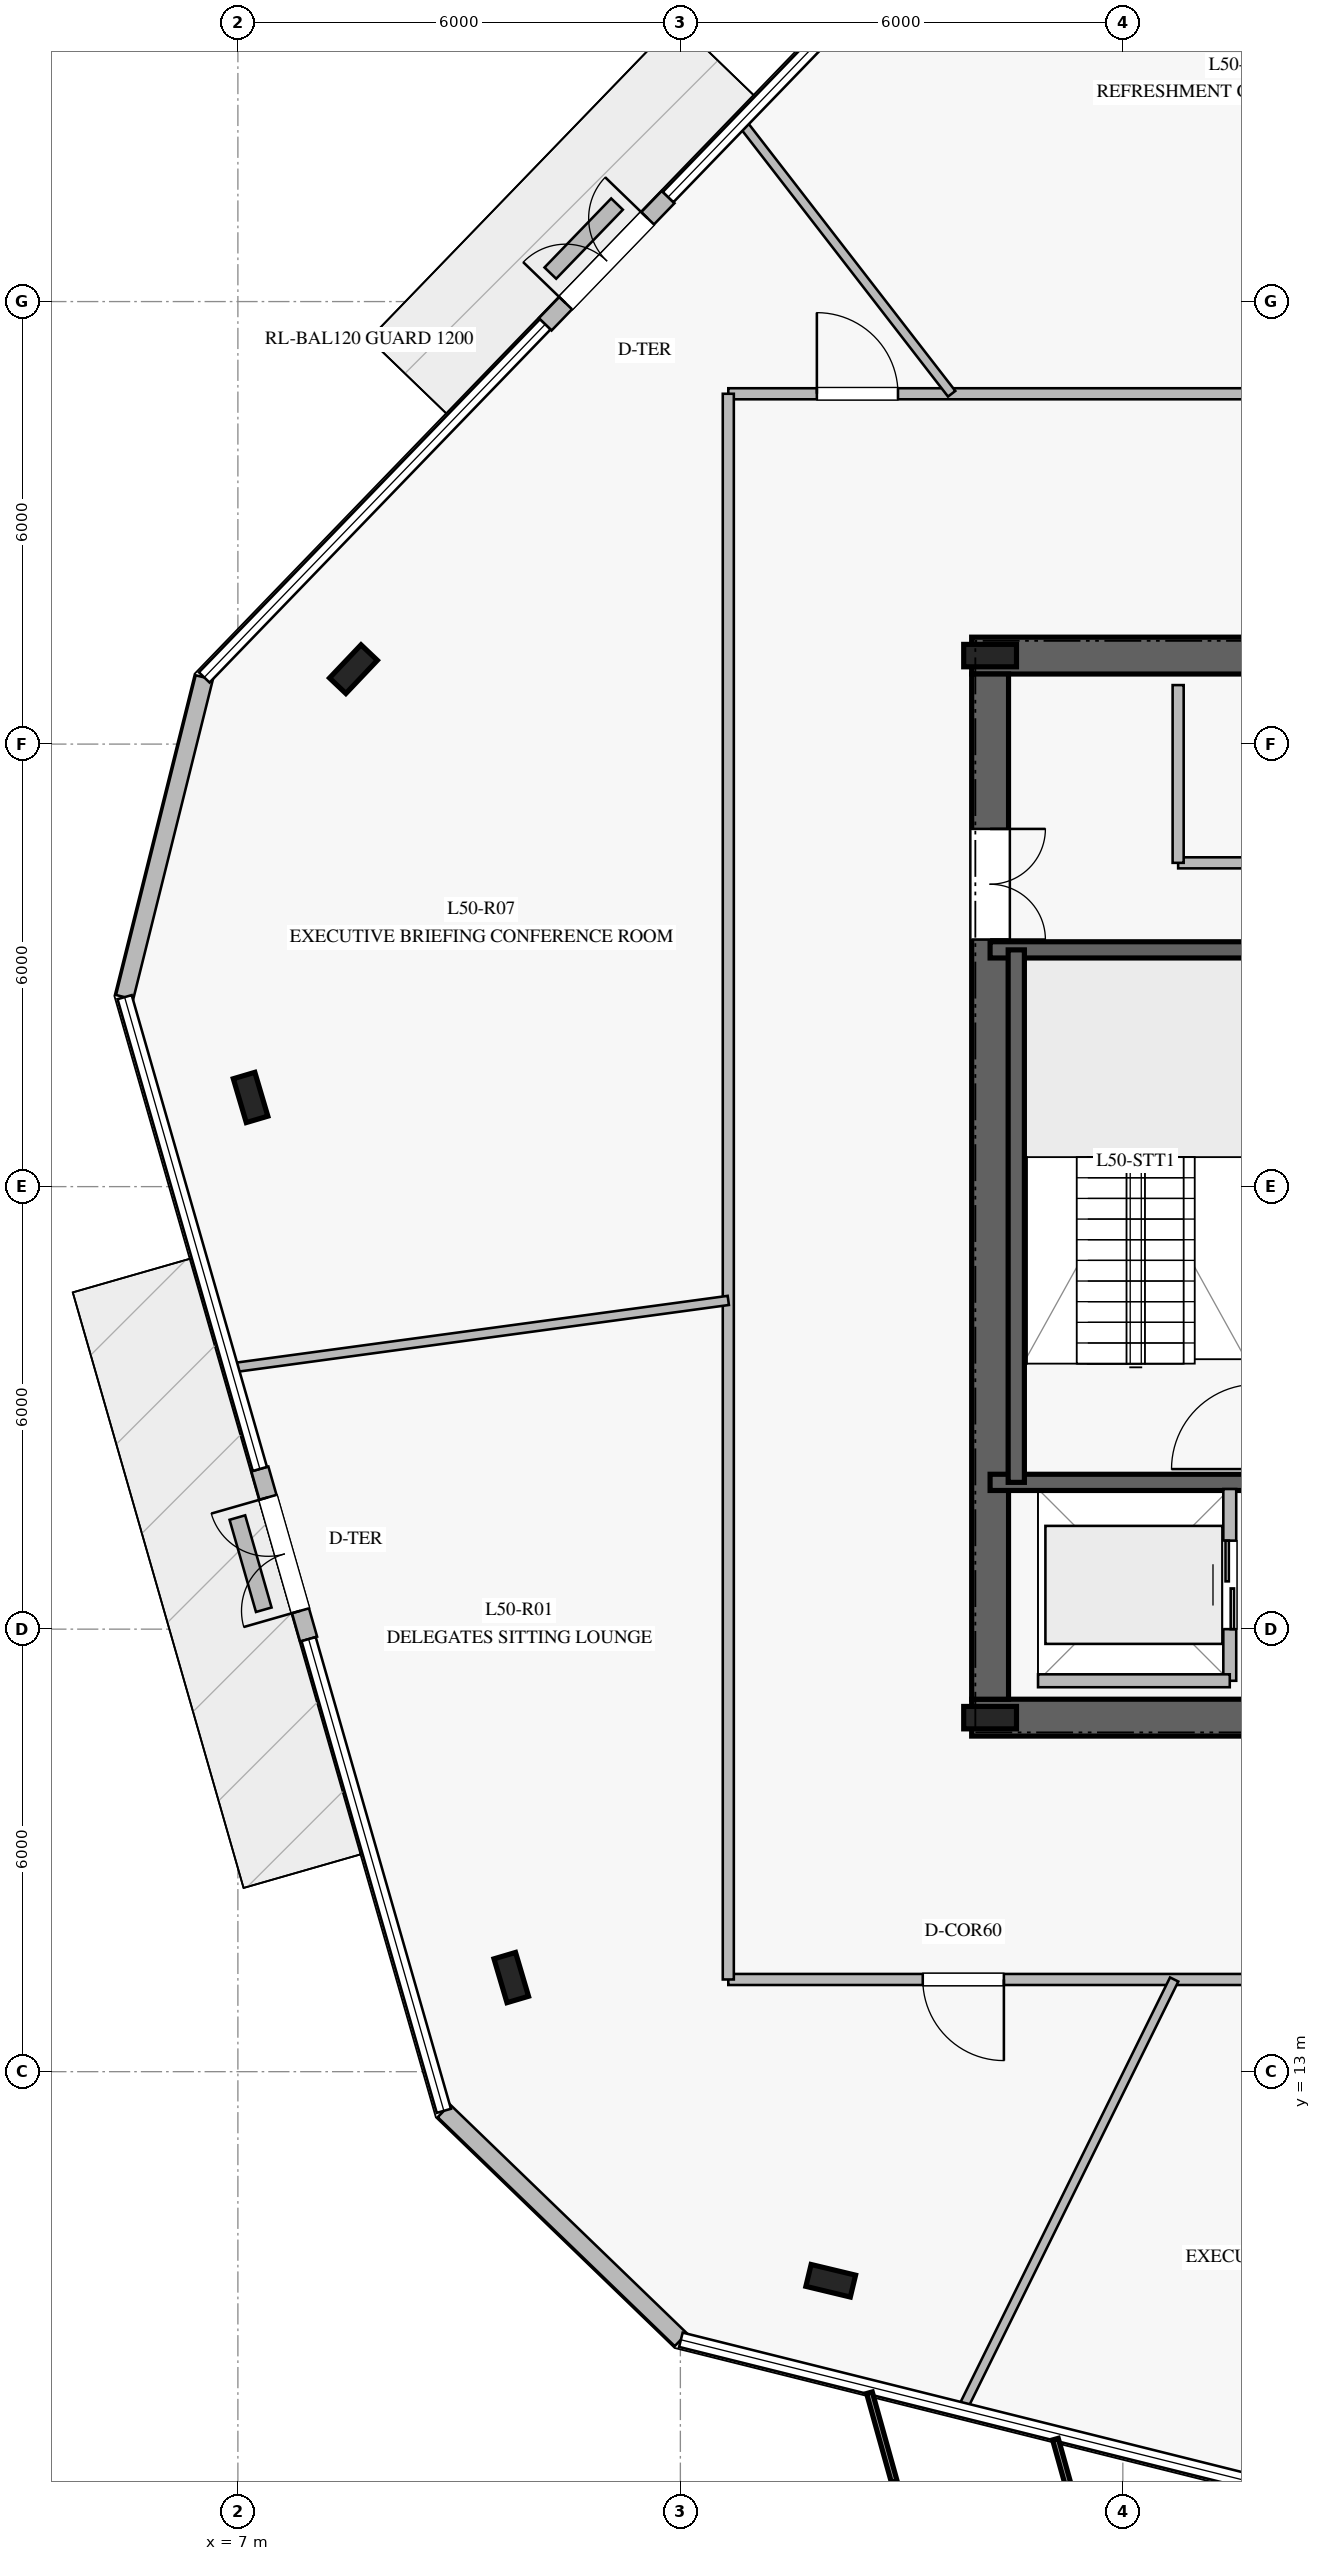
"""IFC4 building model, lengths in metres.
Left out: names, types, materials, properties, quantities, classifications, styles, units other than length and angle.
Written with IfcOpenShell. Run it as: python <this file> out.ifc"""

import sys

from ifc_helpers import new_model, si_unit, direction, frame, frame_2d, origin, origin_2d, place, context, subcontext, project, spatial, rectangle, i_section, extrude, element, fill, save


model = new_model("IFC4")
c1 = context("Model", 3, precision=1e-05, world=origin(), true_north=direction((0.0, 1.0)))
c2 = subcontext(c1, "Body", "Model", "MODEL_VIEW")
j1 = project(units=[si_unit("LENGTHUNIT", "METRE"), si_unit("PLANEANGLEUNIT", "RADIAN")], contexts=[c1])
p1 = place(None, origin())
s1 = spatial("IfcSite", under=j1, at=p1, CompositionType="ELEMENT")
p2 = place(p1, origin())
s2 = spatial("IfcBuilding", under=s1, at=p2, CompositionType="ELEMENT")
p3 = place(p2, frame((0.0, 0.0, 208.8)))
s3 = spatial("IfcBuildingStorey", under=s2, at=p3, CompositionType="ELEMENT", Elevation=208.8)
p4 = place(p3, frame((16.95, 17.8, 0.0), z_axis=(0.0, 0.0, 1.0), x_axis=(1.0, 0.0, 0.0)))
e1 = element("IfcWall", 1, at=p4, inside=s3, PredefinedType="SHEAR", context=c2, shape_type="SweptSolid", body=[
    extrude(rectangle(XDim=16.1, YDim=0.5, at=frame_2d((8.05, 0.0))), origin(), (0.0, 0.0, 1.0), 3.78),
])
p5 = place(p4, frame((5.0, 0.0, 0.0)))
e2 = element("IfcOpeningElement", 2, at=p5, cuts=e1, PredefinedType="OPENING", context=c2, shape_type="SweptSolid", body=[
    extrude(rectangle(XDim=1.2, YDim=2.25, at=frame_2d((0.6, 1.125))), frame((0.0, 0.26, 0.0), z_axis=(0.0, -1.0, 0.0), x_axis=(1.0, 0.0, 0.0)), (0.0, 0.0, 1.0), 0.52),
])
p6 = place(p4, frame((13.95, 0.0, 0.0)))
e3 = element("IfcOpeningElement", 3, at=p6, cuts=e1, PredefinedType="OPENING", context=c2, shape_type="SweptSolid", body=[
    extrude(rectangle(XDim=0.9, YDim=2.1, at=frame_2d((0.45, 1.05))), frame((0.0, 0.26, 0.0), z_axis=(0.0, -1.0, 0.0), x_axis=(1.0, 0.0, 0.0)), (0.0, 0.0, 1.0), 0.52),
])
p7 = place(p4, frame((9.2, 0.0, 0.0)))
e4 = element("IfcOpeningElement", 4, at=p7, cuts=e1, PredefinedType="OPENING", context=c2, shape_type="SweptSolid", body=[
    extrude(rectangle(XDim=1.1, YDim=2.2, at=frame_2d((0.55, 1.1))), frame((0.0, 0.26, 0.0), z_axis=(0.0, -1.0, 0.0), x_axis=(1.0, 0.0, 0.0)), (0.0, 0.0, 1.0), 0.52),
])
p8 = place(p3, frame((33.05, 32.2, 0.0), z_axis=(0.0, 0.0, 1.0), x_axis=(-1.0, 0.0, 0.0)))
e5 = element("IfcWall", 5, at=p8, inside=s3, PredefinedType="SHEAR", context=c2, shape_type="SweptSolid", body=[
    extrude(rectangle(XDim=16.1, YDim=0.5, at=frame_2d((8.05, 0.0))), origin(), (0.0, 0.0, 1.0), 3.78),
])
p9 = place(p8, frame((5.0, 0.0, 0.0)))
e6 = element("IfcOpeningElement", 6, at=p9, cuts=e5, PredefinedType="OPENING", context=c2, shape_type="SweptSolid", body=[
    extrude(rectangle(XDim=1.2, YDim=2.25, at=frame_2d((0.6, 1.125))), frame((0.0, 0.26, 0.0), z_axis=(0.0, -1.0, 0.0), x_axis=(1.0, 0.0, 0.0)), (0.0, 0.0, 1.0), 0.52),
])
p10 = place(p8, frame((9.825, 0.0, 0.0)))
e7 = element("IfcOpeningElement", 7, at=p10, cuts=e5, PredefinedType="OPENING", context=c2, shape_type="SweptSolid", body=[
    extrude(rectangle(XDim=1.1, YDim=2.2, at=frame_2d((0.55, 1.1))), frame((0.0, 0.26, 0.0), z_axis=(0.0, -1.0, 0.0), x_axis=(1.0, 0.0, 0.0)), (0.0, 0.0, 1.0), 0.52),
])
p11 = place(p3, frame((17.2, 31.95, 0.0), z_axis=(0.0, 0.0, 1.0), x_axis=(0.0, -1.0, 0.0)))
e8 = element("IfcWall", 8, at=p11, inside=s3, PredefinedType="SHEAR", context=c2, shape_type="SweptSolid", body=[
    extrude(rectangle(XDim=13.9, YDim=0.5, at=frame_2d((6.95, 0.0))), origin(), (0.0, 0.0, 1.0), 3.78),
])
p12 = place(p11, frame((2.1, 0.0, 0.0)))
e9 = element("IfcOpeningElement", 9, at=p12, cuts=e8, PredefinedType="OPENING", context=c2, shape_type="SweptSolid", body=[
    extrude(rectangle(XDim=1.5, YDim=2.2, at=frame_2d((0.75, 1.1))), frame((0.0, 0.26, 0.0), z_axis=(0.0, -1.0, 0.0), x_axis=(1.0, 0.0, 0.0)), (0.0, 0.0, 1.0), 0.52),
])
for number, where, z_axis, x_axis in (
    (10, (17.2, 17.8, 0.0), (0.0, 0.0, 1.0), (1.0, 0.0, 0.0)),
    (11, (17.2, 32.2, 0.0), (0.0, 0.0, 1.0), (1.0, 0.0, 0.0)),
):
    element("IfcColumn", number, at=place(p3, frame(where, z_axis=z_axis, x_axis=x_axis)), inside=s3, PredefinedType="COLUMN", context=c2, shape_type="SweptSolid", body=[
        extrude(i_section(OverallWidth=0.304, OverallDepth=0.716, WebThickness=0.021, FlangeThickness=0.04, at=origin_2d()), origin(), (0.0, 0.0, 1.0), 4.0),
    ])
for number, where, z_axis, x_axis in (
    (12, (17.2, 20.99, 0.0), (0.0, 0.0, 1.0), (1.0, 0.0, 0.0)),
    (13, (17.2, 28.21, 0.0), (0.0, 0.0, 1.0), (1.0, 0.0, 0.0)),
):
    element("IfcWall", number, at=place(p3, frame(where, z_axis=z_axis, x_axis=x_axis)), inside=s3, PredefinedType="SOLIDWALL", context=c2, shape_type="SweptSolid", body=[
        extrude(rectangle(XDim=3.72, YDim=0.22, at=frame_2d((1.86, 0.0))), origin(), (0.0, 0.0, 1.0), 3.78),
    ])
p13 = place(p3, frame((17.555, 28.21, 0.0), z_axis=(0.0, 0.0, 1.0), x_axis=(0.0, -1.0, 0.0)))
e14 = element("IfcWall", 14, at=p13, inside=s3, PredefinedType="SOLIDWALL", context=c2, shape_type="SweptSolid", body=[
    extrude(rectangle(XDim=7.22, YDim=0.22, at=frame_2d((3.61, 0.0))), origin(), (0.0, 0.0, 1.0), 3.78),
])
for number, where, z_axis, x_axis in (
    (15, (8.567, 32.016, 0.0), (0.0, 0.0, 1.0), (0.688, 0.725, 0.0)),
    (16, (7.172, 26.209, 0.0), (0.0, 0.0, 1.0), (-0.284, 0.959, 0.0)),
    (17, (10.707, 14.276, 0.0), (0.0, 0.0, 1.0), (-0.284, 0.959, 0.0)),
    (18, (15.039, 10.165, 0.0), (0.0, 0.0, 1.0), (-0.972, 0.233, 0.0)),
):
    element("IfcColumn", number, at=place(p3, frame(where, z_axis=z_axis, x_axis=x_axis)), inside=s3, PredefinedType="COLUMN", context=c2, shape_type="SweptSolid", body=[
        extrude(i_section(OverallWidth=0.305, OverallDepth=0.62, WebThickness=0.021, FlangeThickness=0.04, at=origin_2d()), origin(), (0.0, 0.0, 1.0), 4.0),
    ])
p14 = place(p3, frame((12.834, 38.417, 0.0), z_axis=(0.0, 0.0, 1.0), x_axis=(-0.694688923552, -0.719310294305, 0.0)))
e19 = element("IfcWall", 19, at=p14, inside=s3, PredefinedType="STANDARD", context=c2, shape_type="SweptSolid", body=[
    extrude(rectangle(XDim=2.4, YDim=0.24, at=frame_2d((1.2, 0.0))), origin(), (0.0, 0.0, 1.0), 3.78),
])
p15 = place(p14, frame((0.4, 0.0, 0.0)))
e20 = element("IfcOpeningElement", 20, at=p15, cuts=e19, PredefinedType="OPENING", context=c2, shape_type="SweptSolid", body=[
    extrude(rectangle(XDim=1.6, YDim=2.25, at=frame_2d((0.8, 1.125))), frame((0.0, 0.13, 0.0), z_axis=(0.0, -1.0, 0.0), x_axis=(1.0, 0.0, 0.0)), (0.0, 0.0, 1.0), 0.26),
])
p16 = place(p3, frame((6.544, 31.904, 0.0), z_axis=(0.0, 0.0, 1.0), x_axis=(-0.241712587921, -0.970347888564, 0.0)))
e21 = element("IfcWall", 21, at=p16, inside=s3, PredefinedType="STANDARD", context=c2, shape_type="SweptSolid", body=[
    extrude(rectangle(XDim=4.468, YDim=0.24, at=frame_2d((2.234, 0.0))), origin(), (0.0, 0.0, 1.0), 3.78),
])
p17 = place(p3, frame((7.298, 21.172, 0.0), z_axis=(0.0, 0.0, 1.0), x_axis=(0.275379420529, -0.961335620244, 0.0)))
e22 = element("IfcWall", 22, at=p17, inside=s3, PredefinedType="STANDARD", context=c2, shape_type="SweptSolid", body=[
    extrude(rectangle(XDim=2.4, YDim=0.24, at=frame_2d((1.2, 0.0))), origin(), (0.0, 0.0, 1.0), 3.78),
])
p18 = place(p17, frame((0.4, 0.0, 0.0)))
e23 = element("IfcOpeningElement", 23, at=p18, cuts=e22, PredefinedType="OPENING", context=c2, shape_type="SweptSolid", body=[
    extrude(rectangle(XDim=1.6, YDim=2.25, at=frame_2d((0.8, 1.125))), frame((0.0, 0.13, 0.0), z_axis=(0.0, -1.0, 0.0), x_axis=(1.0, 0.0, 0.0)), (0.0, 0.0, 1.0), 0.26),
])
p19 = place(p3, frame((9.793, 12.469, 0.0), z_axis=(0.0, 0.0, 1.0), x_axis=(0.719320489357, -0.69467836701, 0.0)))
e24 = element("IfcWall", 24, at=p19, inside=s3, PredefinedType="STANDARD", context=c2, shape_type="SweptSolid", body=[
    extrude(rectangle(XDim=4.468, YDim=0.24, at=frame_2d((2.234, 0.0))), origin(), (0.0, 0.0, 1.0), 3.78),
])
p20 = place(p3, frame((12.141, 38.322, 0.0), z_axis=(0.0, 0.0, 1.0), x_axis=(-0.694711687204, -0.719288309138, 0.0)))
e25 = element("IfcWall", 25, at=p20, inside=s3, PredefinedType="USERDEFINED", context=c2, shape_type="SweptSolid", body=[
    extrude(rectangle(XDim=1.301, YDim=0.22, at=frame_2d((0.651, 0.0))), origin(), (0.0, 0.0, 1.0), 0.4),
])
p21 = place(p3, frame((6.993, 20.513, 0.0), z_axis=(0.0, 0.0, 1.0), x_axis=(0.275440197567, -0.961318208277, 0.0)))
e26 = element("IfcWall", 26, at=p21, inside=s3, PredefinedType="USERDEFINED", context=c2, shape_type="SweptSolid", body=[
    extrude(rectangle(XDim=1.3, YDim=0.22, at=frame_2d((0.65, 0.0))), origin(), (0.0, 0.0, 1.0), 0.4),
])
p22 = place(p3, frame((19.75, 29.39, 0.0), z_axis=(0.0, 0.0, 1.0), x_axis=(1.0, 0.0, 0.0)))
e27 = element("IfcWall", 27, at=p22, inside=s3, PredefinedType="PARTITIONING", context=c2, shape_type="SweptSolid", body=[
    extrude(rectangle(XDim=5.9, YDim=0.15, at=frame_2d((2.95, 0.0))), origin(), (0.0, 0.0, 1.0), 3.78),
])
p23 = place(p3, frame((19.75, 29.39, 0.0), z_axis=(0.0, 0.0, 1.0), x_axis=(0.0, 1.0, 0.0)))
e28 = element("IfcWall", 28, at=p23, inside=s3, PredefinedType="PARTITIONING", context=c2, shape_type="SweptSolid", body=[
    extrude(rectangle(XDim=2.41, YDim=0.15, at=frame_2d((1.205, 0.0))), origin(), (0.0, 0.0, 1.0), 3.78),
])
p24 = place(p3, frame((20.45, 18.3, 0.0), z_axis=(0.0, 0.0, 1.0), x_axis=(0.0, 1.0, 0.0)))
e29 = element("IfcWall", 29, at=p24, inside=s3, PredefinedType="PARTITIONING", context=c2, shape_type="SweptSolid", body=[
    extrude(rectangle(XDim=2.6, YDim=0.175, at=frame_2d((1.3, 0.0))), origin(), (0.0, 0.0, 1.0), 3.78),
])
p25 = place(p24, frame((0.7, 0.0, 0.0)))
e30 = element("IfcOpeningElement", 30, at=p25, cuts=e29, PredefinedType="OPENING", context=c2, shape_type="SweptSolid", body=[
    extrude(rectangle(XDim=1.2, YDim=2.2, at=frame_2d((0.6, 1.1))), frame((0.0, 0.098, 0.0), z_axis=(0.0, -1.0, 0.0), x_axis=(1.0, 0.0, 0.0)), (0.0, 0.0, 1.0), 0.195),
])
p26 = place(p3, frame((17.85, 18.3, 0.0), z_axis=(0.0, 0.0, 1.0), x_axis=(1.0, 0.0, 0.0)))
e31 = element("IfcWall", 31, at=p26, inside=s3, PredefinedType="PARTITIONING", context=c2, shape_type="SweptSolid", body=[
    extrude(rectangle(XDim=2.6, YDim=0.175, at=frame_2d((1.3, 0.0))), origin(), (0.0, 0.0, 1.0), 3.78),
])
p27 = place(p3, frame((13.65, 35.75, 0.0), z_axis=(0.0, 0.0, 1.0), x_axis=(1.0, 0.0, 0.0)))
e32 = element("IfcWall", 32, at=p27, inside=s3, PredefinedType="PARTITIONING", context=c2, shape_type="SweptSolid", body=[
    extrude(rectangle(XDim=22.7, YDim=0.15, at=frame_2d((11.35, 0.0))), origin(), (0.0, 0.0, 1.0), 3.28),
])
p28 = place(p27, frame((16.835, 0.0, 0.0)))
e33 = element("IfcOpeningElement", 33, at=p28, cuts=e32, PredefinedType="OPENING", context=c2, shape_type="SweptSolid", body=[
    extrude(rectangle(XDim=1.1, YDim=2.2, at=frame_2d((0.55, 1.1))), frame((0.0, 0.085, 0.0), z_axis=(0.0, -1.0, 0.0), x_axis=(1.0, 0.0, 0.0)), (0.0, 0.0, 1.0), 0.17),
])
p29 = place(p27, frame((7.061, 0.0, 0.0)))
e34 = element("IfcOpeningElement", 34, at=p29, cuts=e32, PredefinedType="OPENING", context=c2, shape_type="SweptSolid", body=[
    extrude(rectangle(XDim=1.1, YDim=2.2, at=frame_2d((0.55, 1.1))), frame((0.0, 0.085, 0.0), z_axis=(0.0, -1.0, 0.0), x_axis=(1.0, 0.0, 0.0)), (0.0, 0.0, 1.0), 0.17),
])
p30 = place(p27, frame((1.201, 0.0, 0.0)))
e35 = element("IfcOpeningElement", 35, at=p30, cuts=e32, PredefinedType="OPENING", context=c2, shape_type="SweptSolid", body=[
    extrude(rectangle(XDim=1.1, YDim=2.2, at=frame_2d((0.55, 1.1))), frame((0.0, 0.085, 0.0), z_axis=(0.0, -1.0, 0.0), x_axis=(1.0, 0.0, 0.0)), (0.0, 0.0, 1.0), 0.17),
])
p31 = place(p3, frame((36.35, 14.25, 0.0), z_axis=(0.0, 0.0, 1.0), x_axis=(-1.0, 0.0, 0.0)))
e36 = element("IfcWall", 36, at=p31, inside=s3, PredefinedType="PARTITIONING", context=c2, shape_type="SweptSolid", body=[
    extrude(rectangle(XDim=22.7, YDim=0.15, at=frame_2d((11.35, 0.0))), origin(), (0.0, 0.0, 1.0), 3.28),
])
p32 = place(p31, frame((18.963, 0.0, 0.0)))
e37 = element("IfcOpeningElement", 37, at=p32, cuts=e36, PredefinedType="OPENING", context=c2, shape_type="SweptSolid", body=[
    extrude(rectangle(XDim=1.1, YDim=2.2, at=frame_2d((0.55, 1.1))), frame((0.0, 0.085, 0.0), z_axis=(0.0, -1.0, 0.0), x_axis=(1.0, 0.0, 0.0)), (0.0, 0.0, 1.0), 0.17),
])
p33 = place(p31, frame((11.138, 0.0, 0.0)))
e38 = element("IfcOpeningElement", 38, at=p33, cuts=e36, PredefinedType="OPENING", context=c2, shape_type="SweptSolid", body=[
    extrude(rectangle(XDim=1.1, YDim=2.2, at=frame_2d((0.55, 1.1))), frame((0.0, 0.085, 0.0), z_axis=(0.0, -1.0, 0.0), x_axis=(1.0, 0.0, 0.0)), (0.0, 0.0, 1.0), 0.17),
])
p34 = place(p3, frame((13.65, 14.25, 0.0), z_axis=(0.0, 0.0, 1.0), x_axis=(0.0, 1.0, 0.0)))
e39 = element("IfcWall", 39, at=p34, inside=s3, PredefinedType="PARTITIONING", context=c2, shape_type="SweptSolid", body=[
    extrude(rectangle(XDim=21.5, YDim=0.15, at=frame_2d((10.75, 0.0))), origin(), (0.0, 0.0, 1.0), 3.05),
])
p35 = place(p3, frame((16.679, 35.75, 0.0), z_axis=(0.0, 0.0, 1.0), x_axis=(-0.611968816435, 0.79088189239, 0.0)))
e40 = element("IfcWall", 40, at=p35, inside=s3, PredefinedType="PARTITIONING", context=c2, shape_type="SweptSolid", body=[
    extrude(rectangle(XDim=4.65, YDim=0.125, at=frame_2d((2.325, 0.0))), origin(), (0.0, 0.0, 1.0), 3.18),
])
p36 = place(p3, frame((13.65, 23.457, 0.0), z_axis=(0.0, 0.0, 1.0), x_axis=(-0.990896348714, -0.134626988772, 0.0)))
e41 = element("IfcWall", 41, at=p36, inside=s3, PredefinedType="PARTITIONING", context=c2, shape_type="SweptSolid", body=[
    extrude(rectangle(XDim=6.79, YDim=0.125, at=frame_2d((3.395, 0.0))), origin(), (0.0, 0.0, 1.0), 3.05),
])
p37 = place(p3, frame((19.696, 14.25, 0.0), z_axis=(0.0, 0.0, 1.0), x_axis=(-0.442406889635, -0.896814442348, 0.0)))
e42 = element("IfcWall", 42, at=p37, inside=s3, PredefinedType="PARTITIONING", context=c2, shape_type="SweptSolid", body=[
    extrude(rectangle(XDim=6.49, YDim=0.125, at=frame_2d((3.245, 0.0))), origin(), (0.0, 0.0, 1.0), 3.18),
])
p38 = place(p15, frame((1.6, 0.0, 0.0), z_axis=(0.0, 0.0, 1.0), x_axis=(-1.0, 0.0, 0.0)))
e43 = element("IfcDoor", 43, at=p38, inside=s3, OperationType="DOUBLE_DOOR_SINGLE_SWING", PredefinedType="DOOR", context=c2, shape_type="SweptSolid", body=[
    extrude(rectangle(XDim=1.6, YDim=2.25, at=frame_2d((0.8, 1.125))), frame((0.0, 0.025, 0.0), z_axis=(0.0, -1.0, 0.0), x_axis=(1.0, 0.0, 0.0)), (0.0, 0.0, 1.0), 0.05),
])
fill(e20, e43)
p39 = place(p18, frame((1.6, 0.0, 0.0), z_axis=(0.0, 0.0, 1.0), x_axis=(-1.0, 0.0, 0.0)))
e44 = element("IfcDoor", 44, at=p39, inside=s3, OperationType="DOUBLE_DOOR_SINGLE_SWING", PredefinedType="DOOR", context=c2, shape_type="SweptSolid", body=[
    extrude(rectangle(XDim=1.6, YDim=2.25, at=frame_2d((0.8, 1.125))), frame((0.0, 0.025, 0.0), z_axis=(0.0, -1.0, 0.0), x_axis=(1.0, 0.0, 0.0)), (0.0, 0.0, 1.0), 0.05),
])
fill(e23, e44)
p40 = place(p12, origin())
e45 = element("IfcDoor", 45, at=p40, inside=s3, OperationType="DOUBLE_DOOR_SINGLE_SWING", PredefinedType="DOOR", context=c2, shape_type="SweptSolid", body=[
    extrude(rectangle(XDim=1.5, YDim=2.2, at=frame_2d((0.75, 1.1))), frame((0.0, 0.025, 0.0), z_axis=(0.0, -1.0, 0.0), x_axis=(1.0, 0.0, 0.0)), (0.0, 0.0, 1.0), 0.05),
])
fill(e9, e45)
p41 = place(p25, origin())
e46 = element("IfcDoor", 46, at=p41, inside=s3, OperationType="DOUBLE_DOOR_SLIDING", PredefinedType="DOOR", context=c2, shape_type="SweptSolid", body=[
    extrude(rectangle(XDim=1.2, YDim=2.2, at=frame_2d((0.6, 1.1))), frame((0.0, 0.025, 0.0), z_axis=(0.0, -1.0, 0.0), x_axis=(1.0, 0.0, 0.0)), (0.0, 0.0, 1.0), 0.05),
])
fill(e30, e46)
p42 = place(p32, origin())
e47 = element("IfcDoor", 47, at=p42, inside=s3, OperationType="SINGLE_SWING_LEFT", PredefinedType="DOOR", context=c2, shape_type="SweptSolid", body=[
    extrude(rectangle(XDim=1.1, YDim=2.2, at=frame_2d((0.55, 1.1))), frame((0.0, 0.025, 0.0), z_axis=(0.0, -1.0, 0.0), x_axis=(1.0, 0.0, 0.0)), (0.0, 0.0, 1.0), 0.05),
])
fill(e37, e47)
p43 = place(p30, origin())
e48 = element("IfcDoor", 48, at=p43, inside=s3, OperationType="SINGLE_SWING_LEFT", PredefinedType="DOOR", context=c2, shape_type="SweptSolid", body=[
    extrude(rectangle(XDim=1.1, YDim=2.2, at=frame_2d((0.55, 1.1))), frame((0.0, 0.025, 0.0), z_axis=(0.0, -1.0, 0.0), x_axis=(1.0, 0.0, 0.0)), (0.0, 0.0, 1.0), 0.05),
])
fill(e35, e48)
save(model, sys.argv[1])
